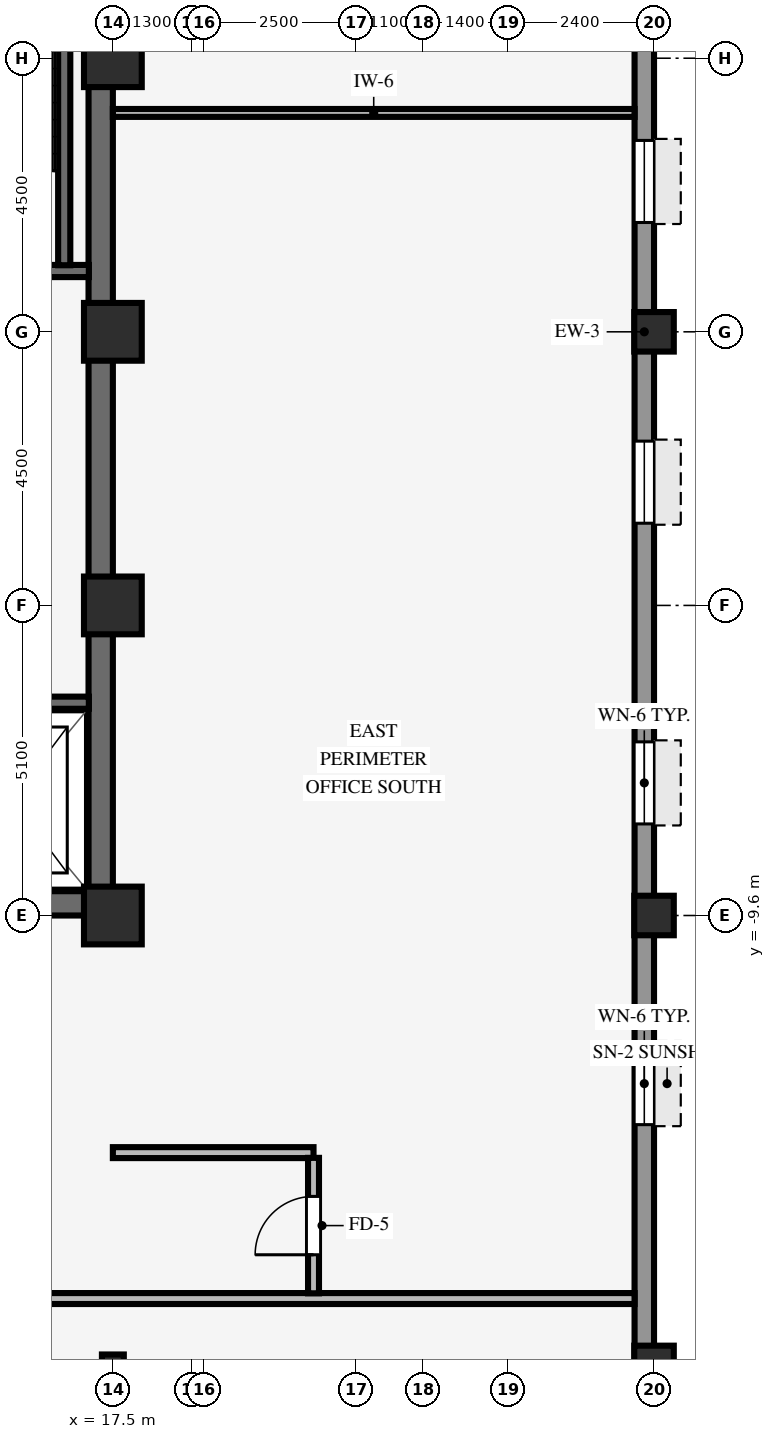
"""IFC4 building model, lengths in metres.
Left out: names, types, materials, properties, quantities, classifications, styles, units other than length and angle.
Written with IfcOpenShell. Run it as: python <this file> out.ifc"""

import sys

from ifc_helpers import new_model, si_unit, direction, frame, frame_2d, origin, origin_2d, place, context, subcontext, project, spatial, rectangle, hollow_rectangle, i_section, extrude, source, transform, mapped, element, fill, save


model = new_model("IFC4")
c1 = context("Model", 3, precision=1e-05, world=origin(), true_north=direction((0.0, 1.0)))
c2 = subcontext(c1, "Body", "Model", "MODEL_VIEW")
j1 = project(units=[si_unit("LENGTHUNIT", "METRE"), si_unit("PLANEANGLEUNIT", "RADIAN")], contexts=[c1])
p1 = place(None, origin())
s1 = spatial("IfcSite", under=j1, at=p1, CompositionType="ELEMENT")
p2 = place(p1, origin())
s2 = spatial("IfcBuilding", under=s1, at=p2, CompositionType="ELEMENT")
p3 = place(p2, frame((0.0, 0.0, 160.35)))
s3 = spatial("IfcBuildingStorey", under=s2, at=p3, CompositionType="ELEMENT", Elevation=160.35)
p4 = place(p3, frame((9.0, -9.4, 0.0), z_axis=(0.0, 0.0, 1.0), x_axis=(1.0, 0.0, 0.0)))
e1 = element("IfcWall", 1, at=p4, inside=s3, PredefinedType="SHEAR", context=c2, shape_type="SweptSolid", body=[
    extrude(rectangle(XDim=8.5, YDim=0.4, at=frame_2d((4.25, 0.0))), origin(), (0.0, 0.0, 1.0), 3.37),
])
p5 = place(p3, frame((17.3, -9.205, 0.0), z_axis=(0.0, 0.0, 1.0), x_axis=(0.0, 1.0, 0.0)))
e2 = element("IfcWall", 2, at=p5, inside=s3, PredefinedType="SHEAR", context=c2, shape_type="SweptSolid", body=[
    extrude(rectangle(XDim=18.41, YDim=0.4, at=frame_2d((9.205, 0.0))), origin(), (0.0, 0.0, 1.0), 3.37),
])
for number, where, z_axis, x_axis in (
    (3, (17.5, -9.6, 0.0), (0.0, 0.0, 1.0), (1.0, 0.0, 0.0)),
    (4, (17.5, -4.5, 0.0), (0.0, 0.0, 1.0), (1.0, 0.0, 0.0)),
    (5, (17.5, 4.5, 0.0), (0.0, 0.0, 1.0), (1.0, 0.0, 0.0)),
    (6, (17.5, 0.0, 0.0), (0.0, 0.0, 1.0), (1.0, 0.0, 0.0)),
):
    element("IfcColumn", number, at=place(p3, frame(where, z_axis=z_axis, x_axis=x_axis)), inside=s3, PredefinedType="COLUMN", context=c2, shape_type="SweptSolid", body=[
        extrude(rectangle(XDim=0.95, YDim=0.95, at=origin_2d()), origin(), (0.0, 0.0, 1.0), 3.37),
    ])
for number, where, z_axis, x_axis in (
    (7, (26.4, -17.0, 0.0), (0.0, 0.0, 1.0), (1.0, 0.0, 0.0)),
    (8, (26.4, -9.6, 0.0), (0.0, 0.0, 1.0), (1.0, 0.0, 0.0)),
    (9, (26.4, 0.0, 0.0), (0.0, 0.0, 1.0), (1.0, 0.0, 0.0)),
):
    element("IfcColumn", number, at=place(p3, frame(where, z_axis=z_axis, x_axis=x_axis)), inside=s3, PredefinedType="COLUMN", context=c2, shape_type="SweptSolid", body=[
        extrude(hollow_rectangle(XDim=0.65, YDim=0.65, WallThickness=0.04, InnerFilletRadius=0.04, OuterFilletRadius=0.08, at=origin_2d()), origin(), (0.0, 0.0, 1.0), 3.37),
    ])
p6 = place(p3, frame((17.5, -17.0, 0.0), z_axis=(0.0, 0.0, 1.0), x_axis=(1.0, 0.0, 0.0)))
e10 = element("IfcColumn", 10, at=p6, inside=s3, PredefinedType="COLUMN", context=c2, shape_type="SweptSolid", body=[
    extrude(i_section(OverallWidth=0.36, OverallDepth=0.36, WebThickness=0.021, FlangeThickness=0.021, FilletRadius=0.018, at=origin_2d()), origin(), (0.0, 0.0, 1.0), 3.37),
])
p7 = place(p3, frame((26.24, -20.784, 0.0), z_axis=(0.0, 0.0, 1.0), x_axis=(0.0, 1.0, 0.0)))
e11 = element("IfcWall", 11, at=p7, inside=s3, PredefinedType="STANDARD", context=c2, shape_type="SweptSolid", body=[
    extrude(rectangle(XDim=41.568, YDim=0.32, at=frame_2d((20.784, 0.0))), origin(), (0.0, 0.0, 1.0), 2.705),
])
p8 = place(p7, frame((1.448, 0.0, 0.8)))
e12 = element("IfcOpeningElement", 12, at=p8, cuts=e11, PredefinedType="OPENING", context=c2, shape_type="SweptSolid", body=[
    extrude(rectangle(XDim=1.35, YDim=1.56, at=frame_2d((0.675, 0.78))), frame((0.0, 0.17, 0.0), z_axis=(0.0, -1.0, 0.0), x_axis=(1.0, 0.0, 0.0)), (0.0, 0.0, 1.0), 0.34),
])
p9 = place(p7, frame((7.744, 0.0, 0.8)))
e13 = element("IfcOpeningElement", 13, at=p9, cuts=e11, PredefinedType="OPENING", context=c2, shape_type="SweptSolid", body=[
    extrude(rectangle(XDim=1.35, YDim=1.56, at=frame_2d((0.675, 0.78))), frame((0.0, 0.17, 0.0), z_axis=(0.0, -1.0, 0.0), x_axis=(1.0, 0.0, 0.0)), (0.0, 0.0, 1.0), 0.34),
])
p10 = place(p7, frame((12.69, 0.0, 0.8)))
e14 = element("IfcOpeningElement", 14, at=p10, cuts=e11, PredefinedType="OPENING", context=c2, shape_type="SweptSolid", body=[
    extrude(rectangle(XDim=1.35, YDim=1.56, at=frame_2d((0.675, 0.78))), frame((0.0, 0.17, 0.0), z_axis=(0.0, -1.0, 0.0), x_axis=(1.0, 0.0, 0.0)), (0.0, 0.0, 1.0), 0.34),
])
p11 = place(p7, frame((17.636, 0.0, 0.8)))
e15 = element("IfcOpeningElement", 15, at=p11, cuts=e11, PredefinedType="OPENING", context=c2, shape_type="SweptSolid", body=[
    extrude(rectangle(XDim=1.35, YDim=1.56, at=frame_2d((0.675, 0.78))), frame((0.0, 0.17, 0.0), z_axis=(0.0, -1.0, 0.0), x_axis=(1.0, 0.0, 0.0)), (0.0, 0.0, 1.0), 0.34),
])
p12 = place(p7, frame((22.582, 0.0, 0.8)))
e16 = element("IfcOpeningElement", 16, at=p12, cuts=e11, PredefinedType="OPENING", context=c2, shape_type="SweptSolid", body=[
    extrude(rectangle(XDim=1.35, YDim=1.56, at=frame_2d((0.675, 0.78))), frame((0.0, 0.17, 0.0), z_axis=(0.0, -1.0, 0.0), x_axis=(1.0, 0.0, 0.0)), (0.0, 0.0, 1.0), 0.34),
])
p13 = place(p7, frame((27.528, 0.0, 0.8)))
e17 = element("IfcOpeningElement", 17, at=p13, cuts=e11, PredefinedType="OPENING", context=c2, shape_type="SweptSolid", body=[
    extrude(rectangle(XDim=1.35, YDim=1.56, at=frame_2d((0.675, 0.78))), frame((0.0, 0.17, 0.0), z_axis=(0.0, -1.0, 0.0), x_axis=(1.0, 0.0, 0.0)), (0.0, 0.0, 1.0), 0.34),
])
p14 = place(p7, frame((32.474, 0.0, 0.8)))
e18 = element("IfcOpeningElement", 18, at=p14, cuts=e11, PredefinedType="OPENING", context=c2, shape_type="SweptSolid", body=[
    extrude(rectangle(XDim=1.35, YDim=1.56, at=frame_2d((0.675, 0.78))), frame((0.0, 0.17, 0.0), z_axis=(0.0, -1.0, 0.0), x_axis=(1.0, 0.0, 0.0)), (0.0, 0.0, 1.0), 0.34),
])
p15 = place(p7, frame((38.77, 0.0, 0.8)))
e19 = element("IfcOpeningElement", 19, at=p15, cuts=e11, PredefinedType="OPENING", context=c2, shape_type="SweptSolid", body=[
    extrude(rectangle(XDim=1.35, YDim=1.56, at=frame_2d((0.675, 0.78))), frame((0.0, 0.17, 0.0), z_axis=(0.0, -1.0, 0.0), x_axis=(1.0, 0.0, 0.0)), (0.0, 0.0, 1.0), 0.34),
])
p16 = place(p3, frame((13.535, 1.0, 0.0), z_axis=(0.0, 0.0, 1.0), x_axis=(1.0, 0.0, 0.0)))
e20 = element("IfcWall", 20, at=p16, inside=s3, PredefinedType="SHEAR", context=c2, shape_type="SweptSolid", body=[
    extrude(rectangle(XDim=3.57, YDim=0.2, at=frame_2d((1.785, 0.0))), origin(), (0.0, 0.0, 1.0), 3.37),
])
p17 = place(p3, frame((16.7, 1.095, 0.0), z_axis=(0.0, 0.0, 1.0), x_axis=(0.0, 1.0, 0.0)))
e21 = element("IfcWall", 21, at=p17, inside=s3, PredefinedType="SHEAR", context=c2, shape_type="SweptSolid", body=[
    extrude(rectangle(XDim=8.11, YDim=0.2, at=frame_2d((4.055, 0.0))), origin(), (0.0, 0.0, 1.0), 3.37),
])
p18 = place(p3, frame((14.645, -6.1, 0.0), z_axis=(0.0, 0.0, 1.0), x_axis=(1.0, 0.0, 0.0)))
e22 = element("IfcWall", 22, at=p18, inside=s3, PredefinedType="SHEAR", context=c2, shape_type="SweptSolid", body=[
    extrude(rectangle(XDim=2.46, YDim=0.2, at=frame_2d((1.23, 0.0))), origin(), (0.0, 0.0, 1.0), 3.37),
])
p19 = place(p3, frame((-26.08, -15.9, 0.0), z_axis=(0.0, 0.0, 1.0), x_axis=(1.0, 0.0, 0.0)))
e23 = element("IfcWall", 23, at=p19, inside=s3, PredefinedType="PARTITIONING", context=c2, shape_type="SweptSolid", body=[
    extrude(rectangle(XDim=52.16, YDim=0.18, at=frame_2d((26.08, 0.0))), origin(), (0.0, 0.0, 1.0), 3.36),
])
p20 = place(p19, frame((41.35, 0.0, 0.0)))
e24 = element("IfcOpeningElement", 24, at=p20, cuts=e23, PredefinedType="OPENING", context=c2, shape_type="SweptSolid", body=[
    extrude(rectangle(XDim=0.96, YDim=2.1, at=frame_2d((0.48, 1.05))), frame((0.0, 0.1, 0.0), z_axis=(0.0, -1.0, 0.0), x_axis=(1.0, 0.0, 0.0)), (0.0, 0.0, 1.0), 0.2),
])
p21 = place(p19, frame((23.34, 0.0, 0.0)))
e25 = element("IfcOpeningElement", 25, at=p21, cuts=e23, PredefinedType="OPENING", context=c2, shape_type="SweptSolid", body=[
    extrude(rectangle(XDim=0.96, YDim=2.1, at=frame_2d((0.48, 1.05))), frame((0.0, 0.1, 0.0), z_axis=(0.0, -1.0, 0.0), x_axis=(1.0, 0.0, 0.0)), (0.0, 0.0, 1.0), 0.2),
])
p22 = place(p19, frame((14.4, 0.0, 0.0)))
e26 = element("IfcOpeningElement", 26, at=p22, cuts=e23, PredefinedType="OPENING", context=c2, shape_type="SweptSolid", body=[
    extrude(rectangle(XDim=0.96, YDim=2.1, at=frame_2d((0.48, 1.05))), frame((0.0, 0.1, 0.0), z_axis=(0.0, -1.0, 0.0), x_axis=(1.0, 0.0, 0.0)), (0.0, 0.0, 1.0), 0.2),
])
p23 = place(p19, frame((30.005, 0.0, 0.0)))
e27 = element("IfcOpeningElement", 27, at=p23, cuts=e23, PredefinedType="OPENING", context=c2, shape_type="SweptSolid", body=[
    extrude(rectangle(XDim=0.96, YDim=2.1, at=frame_2d((0.48, 1.05))), frame((0.0, 0.1, 0.0), z_axis=(0.0, -1.0, 0.0), x_axis=(1.0, 0.0, 0.0)), (0.0, 0.0, 1.0), 0.2),
])
p24 = place(p19, frame((6.65, 0.0, 0.0)))
e28 = element("IfcOpeningElement", 28, at=p24, cuts=e23, PredefinedType="OPENING", context=c2, shape_type="SweptSolid", body=[
    extrude(rectangle(XDim=0.96, YDim=2.1, at=frame_2d((0.48, 1.05))), frame((0.0, 0.1, 0.0), z_axis=(0.0, -1.0, 0.0), x_axis=(1.0, 0.0, 0.0)), (0.0, 0.0, 1.0), 0.2),
])
p25 = place(p3, frame((17.5, -13.5, 0.0), z_axis=(0.0, 0.0, 1.0), x_axis=(1.0, 0.0, 0.0)))
e29 = element("IfcWall", 29, at=p25, inside=s3, PredefinedType="PARTITIONING", context=c2, shape_type="SweptSolid", body=[
    extrude(rectangle(XDim=3.3, YDim=0.18, at=frame_2d((1.65, 0.0))), origin(), (0.0, 0.0, 1.0), 2.998),
])
p26 = place(p3, frame((17.5, 3.6, 0.0), z_axis=(0.0, 0.0, 1.0), x_axis=(1.0, 0.0, 0.0)))
e30 = element("IfcWall", 30, at=p26, inside=s3, PredefinedType="PARTITIONING", context=c2, shape_type="SweptSolid", body=[
    extrude(rectangle(XDim=8.58, YDim=0.13, at=frame_2d((4.29, 0.0))), origin(), (0.0, 0.0, 1.0), 3.36),
])
p27 = place(p3, frame((20.8, -15.814, 0.0), z_axis=(0.0, 0.0, 1.0), x_axis=(0.0, 1.0, 0.0)))
e31 = element("IfcWall", 31, at=p27, inside=s3, PredefinedType="PARTITIONING", context=c2, shape_type="SweptSolid", body=[
    extrude(rectangle(XDim=2.228, YDim=0.18, at=frame_2d((1.114, 0.0))), origin(), (0.0, 0.0, 1.0), 3.36),
])
p28 = place(p27, frame((0.634, 0.0, 0.0)))
e32 = element("IfcOpeningElement", 32, at=p28, cuts=e31, PredefinedType="OPENING", context=c2, shape_type="SweptSolid", body=[
    extrude(rectangle(XDim=0.96, YDim=2.1, at=frame_2d((0.48, 1.05))), frame((0.0, 0.1, 0.0), z_axis=(0.0, -1.0, 0.0), x_axis=(1.0, 0.0, 0.0)), (0.0, 0.0, 1.0), 0.2),
])
m1 = source(origin(), c2, "Body", "SweptSolid", [
    extrude(rectangle(XDim=1.35, YDim=1.56, at=frame_2d((0.675, 0.78))), frame((0.0, 0.03, 0.0), z_axis=(0.0, -1.0, 0.0), x_axis=(1.0, 0.0, 0.0)), (0.0, 0.0, 1.0), 0.06),
])
p29 = place(p9, origin())
e33 = element("IfcWindow", 33, at=p29, inside=s3, PartitioningType="SINGLE_PANEL", PredefinedType="WINDOW", context=c2, shape_type="MappedRepresentation", body=[
    mapped(m1, transform((0.0, 0.0, 0.0), scale=1.0)),
])
fill(e13, e33)
p30 = place(p10, origin())
e34 = element("IfcWindow", 34, at=p30, inside=s3, PartitioningType="SINGLE_PANEL", PredefinedType="WINDOW", context=c2, shape_type="MappedRepresentation", body=[
    mapped(m1, transform((0.0, 0.0, 0.0), scale=1.0)),
])
fill(e14, e34)
p31 = place(p11, origin())
e35 = element("IfcWindow", 35, at=p31, inside=s3, PartitioningType="SINGLE_PANEL", PredefinedType="WINDOW", context=c2, shape_type="MappedRepresentation", body=[
    mapped(m1, transform((0.0, 0.0, 0.0), scale=1.0)),
])
fill(e15, e35)
p32 = place(p12, origin())
e36 = element("IfcWindow", 36, at=p32, inside=s3, PartitioningType="SINGLE_PANEL", PredefinedType="WINDOW", context=c2, shape_type="MappedRepresentation", body=[
    mapped(m1, transform((0.0, 0.0, 0.0), scale=1.0)),
])
fill(e16, e36)
m2 = source(origin(), c2, "Body", "SweptSolid", [
    extrude(rectangle(XDim=0.96, YDim=2.1, at=frame_2d((0.48, 1.05))), frame((0.0, 0.025, 0.0), z_axis=(0.0, -1.0, 0.0), x_axis=(1.0, 0.0, 0.0)), (0.0, 0.0, 1.0), 0.05),
])
p33 = place(p28, origin())
e37 = element("IfcDoor", 37, at=p33, inside=s3, OperationType="SINGLE_SWING_LEFT", PredefinedType="DOOR", context=c2, shape_type="MappedRepresentation", body=[
    mapped(m2, transform((0.0, 0.0, 0.0), scale=1.0)),
])
fill(e32, e37)
save(model, sys.argv[1])
